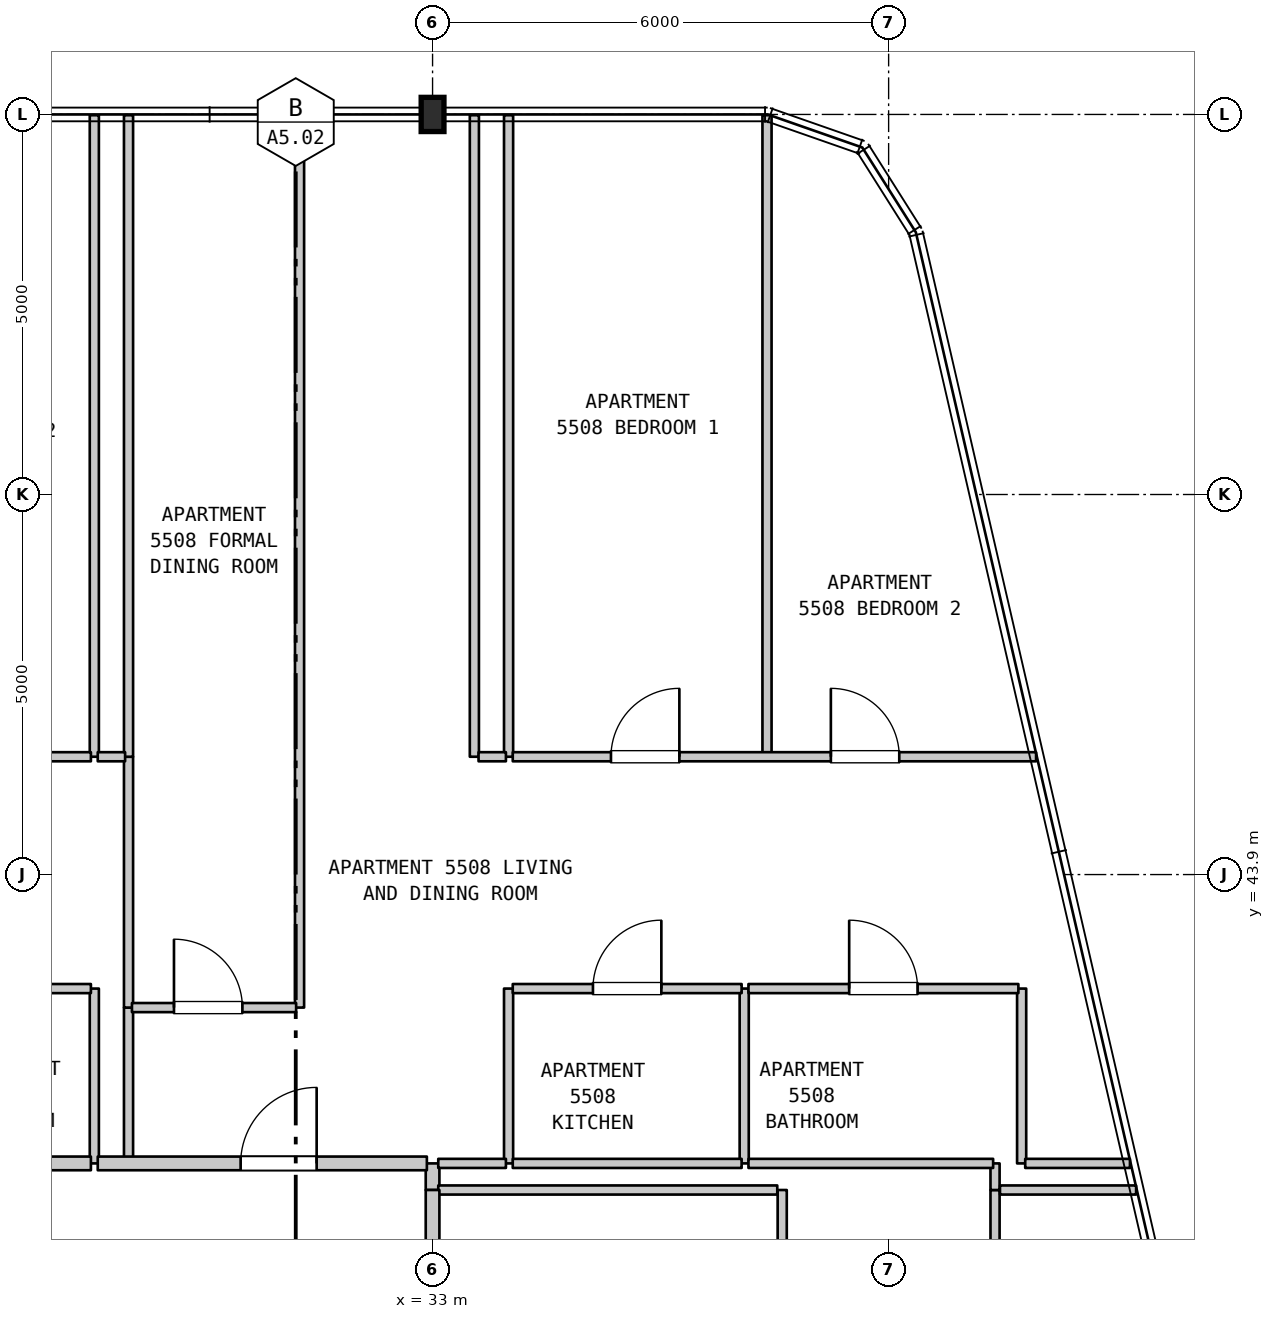
"""IFC4 building model, lengths in metres.
Left out: names, types, materials, properties, quantities, classifications, styles, units other than length and angle.
Written with IfcOpenShell. Run it as: python <this file> out.ifc"""

import sys

from ifc_helpers import new_model, si_unit, direction, frame, frame_2d, origin, origin_2d, place, context, subcontext, project, spatial, rectangle, i_section, extrude, element, fill, save


model = new_model("IFC4")
c1 = context("Model", 3, precision=1e-05, world=origin(), true_north=direction((0.0, 1.0)))
c2 = subcontext(c1, "Body", "Model", "MODEL_VIEW")
j1 = project(units=[si_unit("LENGTHUNIT", "METRE"), si_unit("PLANEANGLEUNIT", "RADIAN")], contexts=[c1])
p1 = place(None, origin())
s1 = spatial("IfcSite", under=j1, at=p1, CompositionType="ELEMENT")
p2 = place(p1, origin())
s2 = spatial("IfcBuilding", under=s1, at=p2, CompositionType="ELEMENT")
p3 = place(p2, frame((0.0, 0.0, 222.8)))
s3 = spatial("IfcBuildingStorey", under=s2, at=p3, CompositionType="ELEMENT", Elevation=222.8)
p4 = place(p3, frame((33.0, 53.9, 0.0), z_axis=(0.0, 0.0, 1.0), x_axis=(1.0, 0.0, 0.0)))
e1 = element("IfcColumn", 1, at=p4, inside=s3, PredefinedType="COLUMN", context=c2, shape_type="SweptSolid", body=[
    extrude(i_section(OverallWidth=0.3, OverallDepth=0.45, WebThickness=0.014, FlangeThickness=0.026, FilletRadius=0.027, at=origin_2d()), origin(), (0.0, 0.0, 1.0), 3.7),
])
p5 = place(p3, frame((28.55, 40.1, 0.0), z_axis=(0.0, 0.0, 1.0), x_axis=(0.0, 1.0, 0.0)))
e2 = element("IfcWall", 2, at=p5, inside=s3, PredefinedType="PARTITIONING", context=c2, shape_type="SweptSolid", body=[
    extrude(rectangle(XDim=2.3, YDim=0.12, at=frame_2d((1.15, 0.0))), origin(), (0.0, 0.0, 1.0), 3.39),
])
p6 = place(p3, frame((28.55, 45.45, 0.0), z_axis=(0.0, 0.0, 1.0), x_axis=(0.0, 1.0, 0.0)))
e3 = element("IfcWall", 3, at=p6, inside=s3, PredefinedType="PARTITIONING", context=c2, shape_type="SweptSolid", body=[
    extrude(rectangle(XDim=8.44, YDim=0.12, at=frame_2d((4.22, 0.0))), origin(), (0.0, 0.0, 1.0), 3.39),
])
p7 = place(p3, frame((29.0, 40.1, 0.0), z_axis=(0.0, 0.0, 1.0), x_axis=(0.0, 1.0, 0.0)))
e4 = element("IfcWall", 4, at=p7, inside=s3, PredefinedType="PARTITIONING", context=c2, shape_type="SweptSolid", body=[
    extrude(rectangle(XDim=2.05, YDim=0.12, at=frame_2d((1.025, 0.0))), origin(), (0.0, 0.0, 1.0), 3.39),
])
p8 = place(p3, frame((29.0, 42.15, 0.0), z_axis=(0.0, 0.0, 1.0), x_axis=(0.0, 1.0, 0.0)))
e5 = element("IfcWall", 5, at=p8, inside=s3, PredefinedType="PARTITIONING", context=c2, shape_type="SweptSolid", body=[
    extrude(rectangle(XDim=3.3, YDim=0.12, at=frame_2d((1.65, 0.0))), origin(), (0.0, 0.0, 1.0), 3.39),
])
p9 = place(p3, frame((29.0, 45.45, 0.0), z_axis=(0.0, 0.0, 1.0), x_axis=(0.0, 1.0, 0.0)))
e6 = element("IfcWall", 6, at=p9, inside=s3, PredefinedType="PARTITIONING", context=c2, shape_type="SweptSolid", body=[
    extrude(rectangle(XDim=8.44, YDim=0.12, at=frame_2d((4.22, 0.0))), origin(), (0.0, 0.0, 1.0), 3.39),
])
p10 = place(p3, frame((31.25, 42.15, 0.0), z_axis=(0.0, 0.0, 1.0), x_axis=(0.0, 1.0, 0.0)))
e7 = element("IfcWall", 7, at=p10, inside=s3, PredefinedType="PARTITIONING", context=c2, shape_type="SweptSolid", body=[
    extrude(rectangle(XDim=11.74, YDim=0.12, at=frame_2d((5.87, 0.0))), origin(), (0.0, 0.0, 1.0), 3.39),
])
p11 = place(p3, frame((33.0, 39.75, 0.0), z_axis=(0.0, 0.0, 1.0), x_axis=(0.0, 1.0, 0.0)))
e8 = element("IfcWall", 8, at=p11, inside=s3, PredefinedType="STANDARD", context=c2, shape_type="SweptSolid", body=[
    extrude(rectangle(XDim=0.35, YDim=0.18, at=frame_2d((0.175, 0.0))), origin(), (0.0, 0.0, 1.0), 3.39),
])
p12 = place(p3, frame((33.55, 45.45, 0.0), z_axis=(0.0, 0.0, 1.0), x_axis=(0.0, 1.0, 0.0)))
e9 = element("IfcWall", 9, at=p12, inside=s3, PredefinedType="PARTITIONING", context=c2, shape_type="SweptSolid", body=[
    extrude(rectangle(XDim=8.44, YDim=0.12, at=frame_2d((4.22, 0.0))), origin(), (0.0, 0.0, 1.0), 3.39),
])
p13 = place(p3, frame((34.0, 40.1, 0.0), z_axis=(0.0, 0.0, 1.0), x_axis=(0.0, 1.0, 0.0)))
e10 = element("IfcWall", 10, at=p13, inside=s3, PredefinedType="PARTITIONING", context=c2, shape_type="SweptSolid", body=[
    extrude(rectangle(XDim=2.3, YDim=0.12, at=frame_2d((1.15, 0.0))), origin(), (0.0, 0.0, 1.0), 3.39),
])
p14 = place(p3, frame((34.0, 45.45, 0.0), z_axis=(0.0, 0.0, 1.0), x_axis=(0.0, 1.0, 0.0)))
e11 = element("IfcWall", 11, at=p14, inside=s3, PredefinedType="PARTITIONING", context=c2, shape_type="SweptSolid", body=[
    extrude(rectangle(XDim=8.44, YDim=0.12, at=frame_2d((4.22, 0.0))), origin(), (0.0, 0.0, 1.0), 3.39),
])
p15 = place(p3, frame((37.1, 40.1, 0.0), z_axis=(0.0, 0.0, 1.0), x_axis=(0.0, 1.0, 0.0)))
e12 = element("IfcWall", 12, at=p15, inside=s3, PredefinedType="PARTITIONING", context=c2, shape_type="SweptSolid", body=[
    extrude(rectangle(XDim=2.3, YDim=0.12, at=frame_2d((1.15, 0.0))), origin(), (0.0, 0.0, 1.0), 3.39),
])
p16 = place(p3, frame((37.4, 45.45, 0.0), z_axis=(0.0, 0.0, 1.0), x_axis=(0.0, 1.0, 0.0)))
e13 = element("IfcWall", 13, at=p16, inside=s3, PredefinedType="PARTITIONING", context=c2, shape_type="SweptSolid", body=[
    extrude(rectangle(XDim=8.44, YDim=0.12, at=frame_2d((4.22, 0.0))), origin(), (0.0, 0.0, 1.0), 3.39),
])
p17 = place(p3, frame((37.6, 37.081, 0.0), z_axis=(0.0, 0.0, 1.0), x_axis=(0.0, 1.0, 0.0)))
e14 = element("IfcWall", 14, at=p17, inside=s3, PredefinedType="PARTITIONING", context=c2, shape_type="SweptSolid", body=[
    extrude(rectangle(XDim=2.669, YDim=0.12, at=frame_2d((1.334, 0.0))), origin(), (0.0, 0.0, 1.0), 3.39),
])
p18 = place(p17, frame((0.814, 0.0, 0.0)))
e15 = element("IfcOpeningElement", 15, at=p18, cuts=e14, PredefinedType="OPENING", context=c2, shape_type="SweptSolid", body=[
    extrude(rectangle(XDim=0.9, YDim=2.15, at=frame_2d((0.45, 1.075))), frame((0.0, 0.07, 0.0), z_axis=(0.0, -1.0, 0.0), x_axis=(1.0, 0.0, 0.0)), (0.0, 0.0, 1.0), 0.14),
])
p19 = place(p3, frame((40.4, 31.9, 0.0), z_axis=(0.0, 0.0, 1.0), x_axis=(0.0, 1.0, 0.0)))
e16 = element("IfcWall", 16, at=p19, inside=s3, PredefinedType="PARTITIONING", context=c2, shape_type="SweptSolid", body=[
    extrude(rectangle(XDim=7.85, YDim=0.12, at=frame_2d((3.925, 0.0))), origin(), (0.0, 0.0, 1.0), 3.39),
])
p20 = place(p19, frame((1.615, 0.0, 0.0)))
e17 = element("IfcOpeningElement", 17, at=p20, cuts=e16, PredefinedType="OPENING", context=c2, shape_type="SweptSolid", body=[
    extrude(rectangle(XDim=0.9, YDim=2.15, at=frame_2d((0.45, 1.075))), frame((0.0, 0.07, 0.0), z_axis=(0.0, -1.0, 0.0), x_axis=(1.0, 0.0, 0.0)), (0.0, 0.0, 1.0), 0.14),
])
p21 = place(p19, frame((5.19, 0.0, 0.0)))
e18 = element("IfcOpeningElement", 18, at=p21, cuts=e16, PredefinedType="OPENING", context=c2, shape_type="SweptSolid", body=[
    extrude(rectangle(XDim=0.9, YDim=2.15, at=frame_2d((0.45, 1.075))), frame((0.0, 0.07, 0.0), z_axis=(0.0, -1.0, 0.0), x_axis=(1.0, 0.0, 0.0)), (0.0, 0.0, 1.0), 0.14),
])
p22 = place(p3, frame((40.4, 39.75, 0.0), z_axis=(0.0, 0.0, 1.0), x_axis=(0.0, 1.0, 0.0)))
e19 = element("IfcWall", 19, at=p22, inside=s3, PredefinedType="PARTITIONING", context=c2, shape_type="SweptSolid", body=[
    extrude(rectangle(XDim=0.35, YDim=0.12, at=frame_2d((0.175, 0.0))), origin(), (0.0, 0.0, 1.0), 3.39),
])
p23 = place(p3, frame((40.75, 40.1, 0.0), z_axis=(0.0, 0.0, 1.0), x_axis=(0.0, 1.0, 0.0)))
e20 = element("IfcWall", 20, at=p23, inside=s3, PredefinedType="PARTITIONING", context=c2, shape_type="SweptSolid", body=[
    extrude(rectangle(XDim=2.3, YDim=0.12, at=frame_2d((1.15, 0.0))), origin(), (0.0, 0.0, 1.0), 3.39),
])
p24 = place(p3, frame((33.075, 39.75, 0.0), z_axis=(0.0, 0.0, 1.0), x_axis=(1.0, 0.0, 0.0)))
e21 = element("IfcWall", 21, at=p24, inside=s3, PredefinedType="PARTITIONING", context=c2, shape_type="SweptSolid", body=[
    extrude(rectangle(XDim=4.46, YDim=0.12, at=frame_2d((2.23, 0.0))), origin(), (0.0, 0.0, 1.0), 3.39),
])
p25 = place(p3, frame((40.465, 39.75, 0.0), z_axis=(0.0, 0.0, 1.0), x_axis=(1.0, 0.0, 0.0)))
e22 = element("IfcWall", 22, at=p25, inside=s3, PredefinedType="PARTITIONING", context=c2, shape_type="SweptSolid", body=[
    extrude(rectangle(XDim=1.791, YDim=0.12, at=frame_2d((0.896, 0.0))), origin(), (0.0, 0.0, 1.0), 3.39),
])
p26 = place(p3, frame((25.22, 40.1, 0.0), z_axis=(0.0, 0.0, 1.0), x_axis=(1.0, 0.0, 0.0)))
e23 = element("IfcWall", 23, at=p26, inside=s3, PredefinedType="STANDARD", context=c2, shape_type="SweptSolid", body=[
    extrude(rectangle(XDim=3.285, YDim=0.18, at=frame_2d((1.643, 0.0))), origin(), (0.0, 0.0, 1.0), 3.39),
])
p27 = place(p3, frame((28.595, 40.1, 0.0), z_axis=(0.0, 0.0, 1.0), x_axis=(1.0, 0.0, 0.0)))
e24 = element("IfcWall", 24, at=p27, inside=s3, PredefinedType="STANDARD", context=c2, shape_type="SweptSolid", body=[
    extrude(rectangle(XDim=4.33, YDim=0.18, at=frame_2d((2.165, 0.0))), origin(), (0.0, 0.0, 1.0), 3.39),
])
p28 = place(p27, frame((1.88, 0.0, 0.0)))
e25 = element("IfcOpeningElement", 25, at=p28, cuts=e24, PredefinedType="OPENING", context=c2, shape_type="SweptSolid", body=[
    extrude(rectangle(XDim=1.0, YDim=2.15, at=frame_2d((0.5, 1.075))), frame((0.0, 0.1, 0.0), z_axis=(0.0, -1.0, 0.0), x_axis=(1.0, 0.0, 0.0)), (0.0, 0.0, 1.0), 0.2),
])
p29 = place(p3, frame((33.075, 40.1, 0.0), z_axis=(0.0, 0.0, 1.0), x_axis=(1.0, 0.0, 0.0)))
e26 = element("IfcWall", 26, at=p29, inside=s3, PredefinedType="PARTITIONING", context=c2, shape_type="SweptSolid", body=[
    extrude(rectangle(XDim=0.89, YDim=0.12, at=frame_2d((0.445, 0.0))), origin(), (0.0, 0.0, 1.0), 3.39),
])
p30 = place(p3, frame((34.055, 40.1, 0.0), z_axis=(0.0, 0.0, 1.0), x_axis=(1.0, 0.0, 0.0)))
e27 = element("IfcWall", 27, at=p30, inside=s3, PredefinedType="PARTITIONING", context=c2, shape_type="SweptSolid", body=[
    extrude(rectangle(XDim=3.011, YDim=0.12, at=frame_2d((1.505, 0.0))), origin(), (0.0, 0.0, 1.0), 3.39),
])
p31 = place(p3, frame((37.156, 40.1, 0.0), z_axis=(0.0, 0.0, 1.0), x_axis=(1.0, 0.0, 0.0)))
e28 = element("IfcWall", 28, at=p31, inside=s3, PredefinedType="PARTITIONING", context=c2, shape_type="SweptSolid", body=[
    extrude(rectangle(XDim=3.219, YDim=0.12, at=frame_2d((1.609, 0.0))), origin(), (0.0, 0.0, 1.0), 3.39),
])
p32 = place(p3, frame((40.797, 40.1, 0.0), z_axis=(0.0, 0.0, 1.0), x_axis=(1.0, 0.0, 0.0)))
e29 = element("IfcWall", 29, at=p32, inside=s3, PredefinedType="PARTITIONING", context=c2, shape_type="SweptSolid", body=[
    extrude(rectangle(XDim=1.378, YDim=0.12, at=frame_2d((0.689, 0.0))), origin(), (0.0, 0.0, 1.0), 3.39),
])
p33 = place(p3, frame((29.045, 42.15, 0.0), z_axis=(0.0, 0.0, 1.0), x_axis=(1.0, 0.0, 0.0)))
e30 = element("IfcWall", 30, at=p33, inside=s3, PredefinedType="PARTITIONING", context=c2, shape_type="SweptSolid", body=[
    extrude(rectangle(XDim=2.16, YDim=0.12, at=frame_2d((1.08, 0.0))), origin(), (0.0, 0.0, 1.0), 3.39),
])
p34 = place(p33, frame((0.553, 0.0, 0.0)))
e31 = element("IfcOpeningElement", 31, at=p34, cuts=e30, PredefinedType="OPENING", context=c2, shape_type="SweptSolid", body=[
    extrude(rectangle(XDim=0.9, YDim=2.15, at=frame_2d((0.45, 1.075))), frame((0.0, 0.07, 0.0), z_axis=(0.0, -1.0, 0.0), x_axis=(1.0, 0.0, 0.0)), (0.0, 0.0, 1.0), 0.14),
])
p35 = place(p3, frame((25.22, 42.4, 0.0), z_axis=(0.0, 0.0, 1.0), x_axis=(1.0, 0.0, 0.0)))
e32 = element("IfcWall", 32, at=p35, inside=s3, PredefinedType="PARTITIONING", context=c2, shape_type="SweptSolid", body=[
    extrude(rectangle(XDim=3.285, YDim=0.12, at=frame_2d((1.643, 0.0))), origin(), (0.0, 0.0, 1.0), 3.39),
])
p36 = place(p35, frame((1.193, 0.0, 0.0)))
e33 = element("IfcOpeningElement", 33, at=p36, cuts=e32, PredefinedType="OPENING", context=c2, shape_type="SweptSolid", body=[
    extrude(rectangle(XDim=0.9, YDim=2.1, at=frame_2d((0.45, 1.05))), frame((0.0, 0.07, 0.0), z_axis=(0.0, -1.0, 0.0), x_axis=(1.0, 0.0, 0.0)), (0.0, 0.0, 1.0), 0.14),
])
p37 = place(p3, frame((34.055, 42.4, 0.0), z_axis=(0.0, 0.0, 1.0), x_axis=(1.0, 0.0, 0.0)))
e34 = element("IfcWall", 34, at=p37, inside=s3, PredefinedType="PARTITIONING", context=c2, shape_type="SweptSolid", body=[
    extrude(rectangle(XDim=3.011, YDim=0.12, at=frame_2d((1.505, 0.0))), origin(), (0.0, 0.0, 1.0), 3.39),
])
p38 = place(p37, frame((1.055, 0.0, 0.0)))
e35 = element("IfcOpeningElement", 35, at=p38, cuts=e34, PredefinedType="OPENING", context=c2, shape_type="SweptSolid", body=[
    extrude(rectangle(XDim=0.9, YDim=2.15, at=frame_2d((0.45, 1.075))), frame((0.0, 0.07, 0.0), z_axis=(0.0, -1.0, 0.0), x_axis=(1.0, 0.0, 0.0)), (0.0, 0.0, 1.0), 0.14),
])
p39 = place(p3, frame((37.156, 42.4, 0.0), z_axis=(0.0, 0.0, 1.0), x_axis=(1.0, 0.0, 0.0)))
e36 = element("IfcWall", 36, at=p39, inside=s3, PredefinedType="PARTITIONING", context=c2, shape_type="SweptSolid", body=[
    extrude(rectangle(XDim=3.551, YDim=0.12, at=frame_2d((1.775, 0.0))), origin(), (0.0, 0.0, 1.0), 3.39),
])
p40 = place(p39, frame((1.325, 0.0, 0.0)))
e37 = element("IfcOpeningElement", 37, at=p40, cuts=e36, PredefinedType="OPENING", context=c2, shape_type="SweptSolid", body=[
    extrude(rectangle(XDim=0.9, YDim=2.1, at=frame_2d((0.45, 1.05))), frame((0.0, 0.07, 0.0), z_axis=(0.0, -1.0, 0.0), x_axis=(1.0, 0.0, 0.0)), (0.0, 0.0, 1.0), 0.14),
])
p41 = place(p3, frame((22.345, 45.45, 0.0), z_axis=(0.0, 0.0, 1.0), x_axis=(1.0, 0.0, 0.0)))
e38 = element("IfcWall", 38, at=p41, inside=s3, PredefinedType="PARTITIONING", context=c2, shape_type="SweptSolid", body=[
    extrude(rectangle(XDim=6.16, YDim=0.12, at=frame_2d((3.08, 0.0))), origin(), (0.0, 0.0, 1.0), 3.39),
])
p42 = place(p41, frame((1.167, 0.0, 0.0)))
e39 = element("IfcOpeningElement", 39, at=p42, cuts=e38, PredefinedType="OPENING", context=c2, shape_type="SweptSolid", body=[
    extrude(rectangle(XDim=0.9, YDim=2.15, at=frame_2d((0.45, 1.075))), frame((0.0, 0.07, 0.0), z_axis=(0.0, -1.0, 0.0), x_axis=(1.0, 0.0, 0.0)), (0.0, 0.0, 1.0), 0.14),
])
p43 = place(p41, frame((3.942, 0.0, 0.0)))
e40 = element("IfcOpeningElement", 40, at=p43, cuts=e38, PredefinedType="OPENING", context=c2, shape_type="SweptSolid", body=[
    extrude(rectangle(XDim=0.9, YDim=2.15, at=frame_2d((0.45, 1.075))), frame((0.0, 0.07, 0.0), z_axis=(0.0, -1.0, 0.0), x_axis=(1.0, 0.0, 0.0)), (0.0, 0.0, 1.0), 0.14),
])
for number, where, z_axis, x_axis in (
    (41, (28.595, 45.45, 0.0), (0.0, 0.0, 1.0), (1.0, 0.0, 0.0)),
    (42, (33.605, 45.45, 0.0), (0.0, 0.0, 1.0), (1.0, 0.0, 0.0)),
):
    element("IfcWall", number, at=place(p3, frame(where, z_axis=z_axis, x_axis=x_axis)), inside=s3, PredefinedType="PARTITIONING", context=c2, shape_type="SweptSolid", body=[
        extrude(rectangle(XDim=0.36, YDim=0.12, at=frame_2d((0.18, 0.0))), origin(), (0.0, 0.0, 1.0), 3.39),
    ])
p44 = place(p3, frame((34.055, 45.45, 0.0), z_axis=(0.0, 0.0, 1.0), x_axis=(1.0, 0.0, 0.0)))
e43 = element("IfcWall", 43, at=p44, inside=s3, PredefinedType="PARTITIONING", context=c2, shape_type="SweptSolid", body=[
    extrude(rectangle(XDim=6.885, YDim=0.12, at=frame_2d((3.442, 0.0))), origin(), (0.0, 0.0, 1.0), 3.39),
])
p45 = place(p44, frame((1.292, 0.0, 0.0)))
e44 = element("IfcOpeningElement", 44, at=p45, cuts=e43, PredefinedType="OPENING", context=c2, shape_type="SweptSolid", body=[
    extrude(rectangle(XDim=0.9, YDim=2.15, at=frame_2d((0.45, 1.075))), frame((0.0, 0.07, 0.0), z_axis=(0.0, -1.0, 0.0), x_axis=(1.0, 0.0, 0.0)), (0.0, 0.0, 1.0), 0.14),
])
p46 = place(p44, frame((4.185, 0.0, 0.0)))
e45 = element("IfcOpeningElement", 45, at=p46, cuts=e43, PredefinedType="OPENING", context=c2, shape_type="SweptSolid", body=[
    extrude(rectangle(XDim=0.9, YDim=2.15, at=frame_2d((0.45, 1.075))), frame((0.0, 0.07, 0.0), z_axis=(0.0, -1.0, 0.0), x_axis=(1.0, 0.0, 0.0)), (0.0, 0.0, 1.0), 0.14),
])
p47 = place(p3, frame((33.0, 37.9, 0.0), z_axis=(0.0, 0.0, 1.0), x_axis=(0.0, 1.0, 0.0)))
e46 = element("IfcWall", 46, at=p47, inside=s3, PredefinedType="STANDARD", context=c2, shape_type="SweptSolid", body=[
    extrude(rectangle(XDim=1.85, YDim=0.18, at=frame_2d((0.925, 0.0))), origin(), (0.0, 0.0, 1.0), 2.79),
])
p48 = place(p28, origin())
e47 = element("IfcDoor", 47, at=p48, inside=s3, OperationType="SINGLE_SWING_RIGHT", PredefinedType="DOOR", context=c2, shape_type="SweptSolid", body=[
    extrude(rectangle(XDim=1.0, YDim=2.15, at=frame_2d((0.5, 1.075))), frame((0.0, 0.025, 0.0), z_axis=(0.0, -1.0, 0.0), x_axis=(1.0, 0.0, 0.0)), (0.0, 0.0, 1.0), 0.05),
])
fill(e25, e47)
p49 = place(p34, origin())
e48 = element("IfcDoor", 48, at=p49, inside=s3, OperationType="SINGLE_SWING_LEFT", PredefinedType="DOOR", context=c2, shape_type="SweptSolid", body=[
    extrude(rectangle(XDim=0.9, YDim=2.15, at=frame_2d((0.45, 1.075))), frame((0.0, 0.025, 0.0), z_axis=(0.0, -1.0, 0.0), x_axis=(1.0, 0.0, 0.0)), (0.0, 0.0, 1.0), 0.05),
])
fill(e31, e48)
p50 = place(p38, origin())
e49 = element("IfcDoor", 49, at=p50, inside=s3, OperationType="SINGLE_SWING_RIGHT", PredefinedType="DOOR", context=c2, shape_type="SweptSolid", body=[
    extrude(rectangle(XDim=0.9, YDim=2.15, at=frame_2d((0.45, 1.075))), frame((0.0, 0.025, 0.0), z_axis=(0.0, -1.0, 0.0), x_axis=(1.0, 0.0, 0.0)), (0.0, 0.0, 1.0), 0.05),
])
fill(e35, e49)
p51 = place(p40, origin())
e50 = element("IfcDoor", 50, at=p51, inside=s3, OperationType="SINGLE_SWING_LEFT", PredefinedType="DOOR", context=c2, shape_type="SweptSolid", body=[
    extrude(rectangle(XDim=0.9, YDim=2.1, at=frame_2d((0.45, 1.05))), frame((0.0, 0.025, 0.0), z_axis=(0.0, -1.0, 0.0), x_axis=(1.0, 0.0, 0.0)), (0.0, 0.0, 1.0), 0.05),
])
fill(e37, e50)
p52 = place(p45, origin())
e51 = element("IfcDoor", 51, at=p52, inside=s3, OperationType="SINGLE_SWING_RIGHT", PredefinedType="DOOR", context=c2, shape_type="SweptSolid", body=[
    extrude(rectangle(XDim=0.9, YDim=2.15, at=frame_2d((0.45, 1.075))), frame((0.0, 0.025, 0.0), z_axis=(0.0, -1.0, 0.0), x_axis=(1.0, 0.0, 0.0)), (0.0, 0.0, 1.0), 0.05),
])
fill(e44, e51)
p53 = place(p46, origin())
e52 = element("IfcDoor", 52, at=p53, inside=s3, OperationType="SINGLE_SWING_LEFT", PredefinedType="DOOR", context=c2, shape_type="SweptSolid", body=[
    extrude(rectangle(XDim=0.9, YDim=2.15, at=frame_2d((0.45, 1.075))), frame((0.0, 0.025, 0.0), z_axis=(0.0, -1.0, 0.0), x_axis=(1.0, 0.0, 0.0)), (0.0, 0.0, 1.0), 0.05),
])
fill(e45, e52)
save(model, sys.argv[1])
